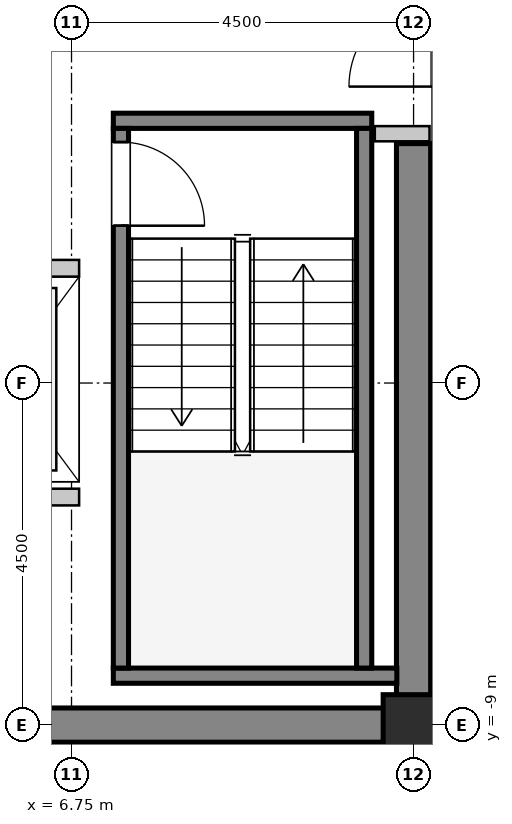
"""IFC4 building model, lengths in metres.
Left out: names, types, materials, properties, quantities, classifications, styles, units other than length and angle.
Written with IfcOpenShell. Run it as: python <this file> out.ifc"""

import sys

from ifc_helpers import new_model, si_unit, direction, frame, frame_2d, origin, origin_2d, place, context, subcontext, project, spatial, rectangle, hollow_rectangle, extrude, source, transform, mapped, element, fill, save


model = new_model("IFC4")
c1 = context("Model", 3, precision=1e-05, world=origin(), true_north=direction((0.0, 1.0)))
c2 = subcontext(c1, "Body", "Model", "MODEL_VIEW")
j1 = project(units=[si_unit("LENGTHUNIT", "METRE"), si_unit("PLANEANGLEUNIT", "RADIAN")], contexts=[c1])
p1 = place(None, origin())
s1 = spatial("IfcSite", under=j1, at=p1, CompositionType="ELEMENT")
p2 = place(p1, origin())
s2 = spatial("IfcBuilding", under=s1, at=p2, CompositionType="ELEMENT")
p3 = place(p2, frame((0.0, 0.0, 244.6)))
s3 = spatial("IfcBuildingStorey", under=s2, at=p3, CompositionType="ELEMENT", Elevation=244.6)
m1 = source(origin(), c2, "Body", "SweptSolid", [
    extrude(rectangle(XDim=9.925, YDim=0.45, at=frame_2d((4.962, 0.0))), origin(), (0.0, 0.0, 1.0), 3.8),
])
p4 = place(p3, frame((1.55, -9.0, 0.0), z_axis=(0.0, 0.0, 1.0), x_axis=(1.0, 0.0, 0.0)))
e1 = element("IfcWall", 1, at=p4, inside=s3, PredefinedType="SHEAR", context=c2, shape_type="MappedRepresentation", body=[
    mapped(m1, transform((0.0, 0.0, 0.0), x_axis=(1.0, 0.0, 0.0), y_axis=(0.0, 1.0, 0.0), z_axis=(0.0, 0.0, 1.0), scale=1.0)),
])
m2 = source(origin(), c2, "Body", "SweptSolid", [
    extrude(rectangle(XDim=7.425, YDim=0.45, at=frame_2d((3.712, 0.0))), origin(), (0.0, 0.0, 1.0), 3.8),
])
p5 = place(p3, frame((11.25, -8.775, 0.0), z_axis=(0.0, 0.0, 1.0), x_axis=(0.0, 1.0, 0.0)))
e2 = element("IfcWall", 2, at=p5, inside=s3, PredefinedType="SHEAR", context=c2, shape_type="MappedRepresentation", body=[
    mapped(m2, transform((0.0, 0.0, 0.0), x_axis=(1.0, 0.0, 0.0), y_axis=(0.0, 1.0, 0.0), z_axis=(0.0, 0.0, 1.0), scale=1.0)),
])
m3 = source(origin(), c2, "Body", "SweptSolid", [
    extrude(hollow_rectangle(XDim=0.8, YDim=0.8, WallThickness=0.04, InnerFilletRadius=0.04, OuterFilletRadius=0.08, at=origin_2d()), origin(), (0.0, 0.0, 1.0), 3.8),
])
p6 = place(p3, frame((11.25, -9.0, 0.0), z_axis=(0.0, 0.0, 1.0), x_axis=(1.0, 0.0, 0.0)))
e3 = element("IfcColumn", 3, at=p6, inside=s3, PredefinedType="COLUMN", context=c2, shape_type="MappedRepresentation", body=[
    mapped(m3, transform((0.0, 0.0, 0.0), x_axis=(1.0, 0.0, 0.0), y_axis=(0.0, 1.0, 0.0), z_axis=(0.0, 0.0, 1.0), scale=1.0)),
])
m4 = source(origin(), c2, "Body", "SweptSolid", [
    extrude(rectangle(XDim=3.4, YDim=0.2, at=frame_2d((1.7, 0.0))), origin(), (0.0, 0.0, 1.0), 3.8),
])
p7 = place(p3, frame((7.3, -1.05, 0.0), z_axis=(0.0, 0.0, 1.0), x_axis=(1.0, 0.0, 0.0)))
e4 = element("IfcWall", 4, at=p7, inside=s3, PredefinedType="SOLIDWALL", context=c2, shape_type="MappedRepresentation", body=[
    mapped(m4, transform((0.0, 0.0, 0.0), x_axis=(1.0, 0.0, 0.0), y_axis=(0.0, 1.0, 0.0), z_axis=(0.0, 0.0, 1.0), scale=1.0)),
])
m5 = source(origin(), c2, "Body", "SweptSolid", [
    extrude(rectangle(XDim=3.73, YDim=0.2, at=frame_2d((1.865, 0.0))), origin(), (0.0, 0.0, 1.0), 3.8),
])
p8 = place(p3, frame((7.3, -8.35, 0.0), z_axis=(0.0, 0.0, 1.0), x_axis=(1.0, 0.0, 0.0)))
e5 = element("IfcWall", 5, at=p8, inside=s3, PredefinedType="SOLIDWALL", context=c2, shape_type="MappedRepresentation", body=[
    mapped(m5, transform((0.0, 0.0, 0.0), x_axis=(1.0, 0.0, 0.0), y_axis=(0.0, 1.0, 0.0), z_axis=(0.0, 0.0, 1.0), scale=1.0)),
])
m6 = source(origin(), c2, "Body", "SweptSolid", [
    extrude(rectangle(XDim=7.1, YDim=0.2, at=frame_2d((3.55, 0.0))), origin(), (0.0, 0.0, 1.0), 3.8),
])
p9 = place(p3, frame((7.4, -1.15, 0.0), z_axis=(0.0, 0.0, 1.0), x_axis=(0.0, -1.0, 0.0)))
e6 = element("IfcWall", 6, at=p9, inside=s3, PredefinedType="SOLIDWALL", context=c2, shape_type="MappedRepresentation", body=[
    mapped(m6, transform((0.0, 0.0, 0.0), x_axis=(1.0, 0.0, 0.0), y_axis=(0.0, 1.0, 0.0), z_axis=(0.0, 0.0, 1.0), scale=1.0)),
])
p10 = place(p9, frame((0.18, 0.0, 0.0)))
e7 = element("IfcOpeningElement", 7, at=p10, cuts=e6, PredefinedType="OPENING", context=c2, shape_type="SweptSolid", body=[
    extrude(rectangle(XDim=1.1, YDim=2.15, at=frame_2d((0.55, 1.075))), frame((0.0, 0.11, 0.0), z_axis=(0.0, -1.0, 0.0), x_axis=(1.0, 0.0, 0.0)), (0.0, 0.0, 1.0), 0.22),
])
p11 = place(p3, frame((10.6, -1.15, 0.0), z_axis=(0.0, 0.0, 1.0), x_axis=(0.0, -1.0, 0.0)))
e8 = element("IfcWall", 8, at=p11, inside=s3, PredefinedType="SOLIDWALL", context=c2, shape_type="MappedRepresentation", body=[
    mapped(m6, transform((0.0, 0.0, 0.0), x_axis=(1.0, 0.0, 0.0), y_axis=(0.0, 1.0, 0.0), z_axis=(0.0, 0.0, 1.0), scale=1.0)),
])
m7 = source(origin(), c2, "Body", "SweptSolid", [
    extrude(rectangle(XDim=2.0, YDim=0.22, at=frame_2d((1.0, 0.0))), origin(), (0.0, 0.0, 1.0), 3.535),
])
p12 = place(p3, frame((6.85, -2.99, 0.0), z_axis=(0.0, 0.0, 1.0), x_axis=(-1.0, 0.0, 0.0)))
e9 = element("IfcWall", 9, at=p12, inside=s3, PredefinedType="SOLIDWALL", context=c2, shape_type="MappedRepresentation", body=[
    mapped(m7, transform((0.0, 0.0, 0.0), x_axis=(1.0, 0.0, 0.0), y_axis=(0.0, 1.0, 0.0), z_axis=(0.0, 0.0, 1.0), scale=1.0)),
])
p13 = place(p12, frame((0.4, 0.0, 0.0)))
e10 = element("IfcOpeningElement", 10, at=p13, cuts=e9, PredefinedType="OPENING", context=c2, shape_type="SweptSolid", body=[
    extrude(rectangle(XDim=1.2, YDim=2.2, at=frame_2d((0.6, 1.1))), frame((0.0, 0.12, 0.0), z_axis=(0.0, -1.0, 0.0), x_axis=(1.0, 0.0, 0.0)), (0.0, 0.0, 1.0), 0.24),
])
m8 = source(origin(), c2, "Body", "SweptSolid", [
    extrude(rectangle(XDim=2.095, YDim=0.22, at=frame_2d((1.048, 0.0))), origin(), (0.0, 0.0, 1.0), 3.535),
])
p14 = place(p3, frame((4.755, -6.0, 0.0), z_axis=(0.0, 0.0, 1.0), x_axis=(1.0, 0.0, 0.0)))
e11 = element("IfcWall", 11, at=p14, inside=s3, PredefinedType="SOLIDWALL", context=c2, shape_type="MappedRepresentation", body=[
    mapped(m8, transform((0.0, 0.0, 0.0), x_axis=(1.0, 0.0, 0.0), y_axis=(0.0, 1.0, 0.0), z_axis=(0.0, 0.0, 1.0), scale=1.0)),
])
m9 = source(origin(), c2, "Body", "SweptSolid", [
    extrude(rectangle(XDim=0.72, YDim=0.2, at=frame_2d((0.36, 0.0))), origin(), (0.0, 0.0, 1.0), 3.535),
])
p15 = place(p3, frame((10.74, -1.22, 0.0), z_axis=(0.0, 0.0, 1.0), x_axis=(1.0, 0.0, 0.0)))
e12 = element("IfcWall", 12, at=p15, inside=s3, PredefinedType="PARTITIONING", context=c2, shape_type="MappedRepresentation", body=[
    mapped(m9, transform((0.0, 0.0, 0.0), x_axis=(1.0, 0.0, 0.0), y_axis=(0.0, 1.0, 0.0), z_axis=(0.0, 0.0, 1.0), scale=1.0)),
])
m10 = source(origin(), c2, "Body", "SweptSolid", [
    extrude(rectangle(XDim=1.1, YDim=2.15, at=frame_2d((0.55, 1.075))), frame((0.0, 0.025, 0.0), z_axis=(0.0, -1.0, 0.0), x_axis=(1.0, 0.0, 0.0)), (0.0, 0.0, 1.0), 0.05),
])
p16 = place(p10, origin())
e13 = element("IfcDoor", 13, at=p16, inside=s3, OperationType="SINGLE_SWING_RIGHT", PredefinedType="DOOR", context=c2, shape_type="MappedRepresentation", body=[
    mapped(m10, transform((0.0, 0.0, 0.0), x_axis=(1.0, 0.0, 0.0), y_axis=(0.0, 1.0, 0.0), z_axis=(0.0, 0.0, 1.0), scale=1.0)),
])
fill(e7, e13)
save(model, sys.argv[1])
